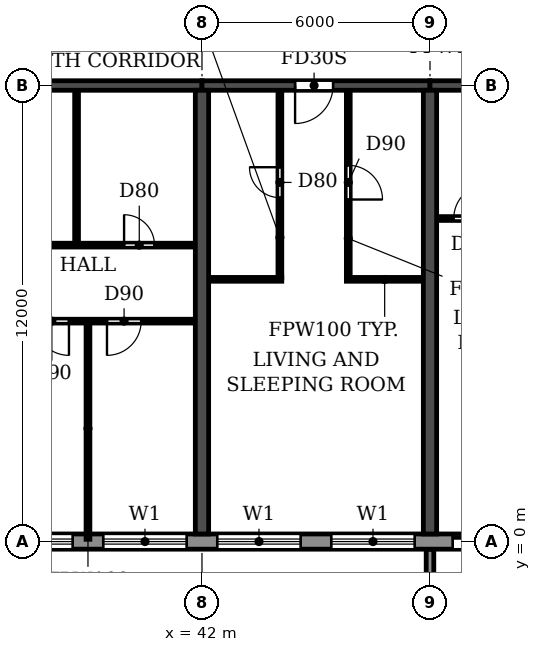
"""IFC4 building model, lengths in metres.
Left out: names, types, materials, properties, quantities, classifications, styles, units other than length and angle.
Written with IfcOpenShell. Run it as: python <this file> out.ifc"""

import sys

from ifc_helpers import new_model, si_unit, direction, frame, frame_2d, origin, place, context, subcontext, project, spatial, polyline, rectangle, outline, extrude, source, transform, mapped, element, fill, save


model = new_model("IFC4")
c1 = context("Model", 3, precision=1e-05, world=origin(), true_north=direction((0.0, 1.0)))
c2 = subcontext(c1, "Body", "Model", "MODEL_VIEW")
j1 = project(units=[si_unit("LENGTHUNIT", "METRE"), si_unit("PLANEANGLEUNIT", "RADIAN")], contexts=[c1])
p1 = place(None, origin())
s1 = spatial("IfcSite", under=j1, at=p1, CompositionType="ELEMENT")
p2 = place(p1, origin())
s2 = spatial("IfcBuilding", under=s1, at=p2, CompositionType="ELEMENT")
p3 = place(p2, frame((0.0, 0.0, 112.5)))
s3 = spatial("IfcBuildingStorey", under=s2, at=p3, CompositionType="ELEMENT", Elevation=112.5)
for number, where, z_axis, x_axis in (
    (1, (42.0, 0.2, 0.0), (0.0, 0.0, 1.0), (0.0, 1.0, 0.0)),
    (2, (48.0, 0.2, 0.0), (0.0, 0.0, 1.0), (0.0, 1.0, 0.0)),
):
    element("IfcWall", number, at=place(p3, frame(where, z_axis=z_axis, x_axis=x_axis)), inside=s3, PredefinedType="SHEAR", context=c2, shape_type="SweptSolid", body=[
        extrude(rectangle(XDim=11.675, YDim=0.35, at=frame_2d((5.837, 0.0))), origin(), (0.0, 0.0, 1.0), 2.95),
    ])
p4 = place(p3, frame((36.0, 12.0, 0.0), z_axis=(0.0, 0.0, 1.0), x_axis=(1.0, 0.0, 0.0)))
e3 = element("IfcWall", 3, at=p4, inside=s3, PredefinedType="SHEAR", context=c2, shape_type="SweptSolid", body=[
    extrude(rectangle(XDim=6.0, YDim=0.25, at=frame_2d((3.0, 0.0))), origin(), (0.0, 0.0, 1.0), 2.35),
])
p5 = place(p3, frame((42.0, 12.0, 0.0), z_axis=(0.0, 0.0, 1.0), x_axis=(1.0, 0.0, 0.0)))
e4 = element("IfcWall", 4, at=p5, inside=s3, PredefinedType="SHEAR", context=c2, shape_type="SweptSolid", body=[
    extrude(rectangle(XDim=6.0, YDim=0.25, at=frame_2d((3.0, 0.0))), origin(), (0.0, 0.0, 1.0), 2.35),
])
p6 = place(p5, frame((2.45, 0.0, 0.0)))
e5 = element("IfcOpeningElement", 5, at=p6, cuts=e4, PredefinedType="OPENING", context=c2, shape_type="SweptSolid", body=[
    extrude(rectangle(XDim=1.0, YDim=2.1, at=frame_2d((0.5, 1.05))), frame((0.0, 0.135, 0.0), z_axis=(0.0, -1.0, 0.0), x_axis=(1.0, 0.0, 0.0)), (0.0, 0.0, 1.0), 0.27),
])
p7 = place(p3, frame((48.0, 12.0, 0.0), z_axis=(0.0, 0.0, 1.0), x_axis=(1.0, 0.0, 0.0)))
e6 = element("IfcWall", 6, at=p7, inside=s3, PredefinedType="SHEAR", context=c2, shape_type="SweptSolid", body=[
    extrude(rectangle(XDim=6.0, YDim=0.25, at=frame_2d((3.0, 0.0))), origin(), (0.0, 0.0, 1.0), 2.35),
])
p8 = place(p7, frame((2.55, 0.0, 0.0)))
e7 = element("IfcOpeningElement", 7, at=p8, cuts=e6, PredefinedType="OPENING", context=c2, shape_type="SweptSolid", body=[
    extrude(rectangle(XDim=1.0, YDim=2.1, at=frame_2d((0.5, 1.05))), frame((0.0, 0.135, 0.0), z_axis=(0.0, -1.0, 0.0), x_axis=(1.0, 0.0, 0.0)), (0.0, 0.0, 1.0), 0.27),
])
p9 = place(p3, frame((16.683, 0.0, 0.0), z_axis=(0.0, 0.0, 1.0), x_axis=(1.0, 0.0, 0.0)))
e8 = element("IfcWall", 8, at=p9, inside=s3, PredefinedType="STANDARD", context=c2, shape_type="SweptSolid", body=[
    extrude(rectangle(XDim=68.634, YDim=0.4, at=frame_2d((34.317, 0.0))), origin(), (0.0, 0.0, 1.0), 2.95),
])
p10 = place(p9, frame((1.717, 0.0, 0.9)))
e9 = element("IfcOpeningElement", 9, at=p10, cuts=e8, PredefinedType="OPENING", context=c2, shape_type="SweptSolid", body=[
    extrude(rectangle(XDim=2.2, YDim=1.5, at=frame_2d((1.1, 0.75))), frame((0.0, 0.21, 0.0), z_axis=(0.0, -1.0, 0.0), x_axis=(1.0, 0.0, 0.0)), (0.0, 0.0, 1.0), 0.42),
])
p11 = place(p9, frame((4.717, 0.0, 0.9)))
e10 = element("IfcOpeningElement", 10, at=p11, cuts=e8, PredefinedType="OPENING", context=c2, shape_type="SweptSolid", body=[
    extrude(rectangle(XDim=2.2, YDim=1.5, at=frame_2d((1.1, 0.75))), frame((0.0, 0.21, 0.0), z_axis=(0.0, -1.0, 0.0), x_axis=(1.0, 0.0, 0.0)), (0.0, 0.0, 1.0), 0.42),
])
p12 = place(p9, frame((7.717, 0.0, 0.9)))
e11 = element("IfcOpeningElement", 11, at=p12, cuts=e8, PredefinedType="OPENING", context=c2, shape_type="SweptSolid", body=[
    extrude(rectangle(XDim=2.2, YDim=1.5, at=frame_2d((1.1, 0.75))), frame((0.0, 0.21, 0.0), z_axis=(0.0, -1.0, 0.0), x_axis=(1.0, 0.0, 0.0)), (0.0, 0.0, 1.0), 0.42),
])
p13 = place(p9, frame((10.917, 0.0, 0.0)))
e12 = element("IfcOpeningElement", 12, at=p13, cuts=e8, PredefinedType="OPENING", context=c2, shape_type="SweptSolid", body=[
    extrude(rectangle(XDim=1.8, YDim=2.4, at=frame_2d((0.9, 1.2))), frame((0.0, 0.21, 0.0), z_axis=(0.0, -1.0, 0.0), x_axis=(1.0, 0.0, 0.0)), (0.0, 0.0, 1.0), 0.42),
])
p14 = place(p9, frame((13.717, 0.0, 0.9)))
e13 = element("IfcOpeningElement", 13, at=p14, cuts=e8, PredefinedType="OPENING", context=c2, shape_type="SweptSolid", body=[
    extrude(rectangle(XDim=2.2, YDim=1.5, at=frame_2d((1.1, 0.75))), frame((0.0, 0.21, 0.0), z_axis=(0.0, -1.0, 0.0), x_axis=(1.0, 0.0, 0.0)), (0.0, 0.0, 1.0), 0.42),
])
p15 = place(p9, frame((16.717, 0.0, 0.9)))
e14 = element("IfcOpeningElement", 14, at=p15, cuts=e8, PredefinedType="OPENING", context=c2, shape_type="SweptSolid", body=[
    extrude(rectangle(XDim=2.2, YDim=1.5, at=frame_2d((1.1, 0.75))), frame((0.0, 0.21, 0.0), z_axis=(0.0, -1.0, 0.0), x_axis=(1.0, 0.0, 0.0)), (0.0, 0.0, 1.0), 0.42),
])
p16 = place(p9, frame((19.717, 0.0, 0.9)))
e15 = element("IfcOpeningElement", 15, at=p16, cuts=e8, PredefinedType="OPENING", context=c2, shape_type="SweptSolid", body=[
    extrude(rectangle(XDim=2.2, YDim=1.5, at=frame_2d((1.1, 0.75))), frame((0.0, 0.21, 0.0), z_axis=(0.0, -1.0, 0.0), x_axis=(1.0, 0.0, 0.0)), (0.0, 0.0, 1.0), 0.42),
])
p17 = place(p9, frame((22.717, 0.0, 0.9)))
e16 = element("IfcOpeningElement", 16, at=p17, cuts=e8, PredefinedType="OPENING", context=c2, shape_type="SweptSolid", body=[
    extrude(rectangle(XDim=2.2, YDim=1.5, at=frame_2d((1.1, 0.75))), frame((0.0, 0.21, 0.0), z_axis=(0.0, -1.0, 0.0), x_axis=(1.0, 0.0, 0.0)), (0.0, 0.0, 1.0), 0.42),
])
p18 = place(p9, frame((25.717, 0.0, 0.9)))
e17 = element("IfcOpeningElement", 17, at=p18, cuts=e8, PredefinedType="OPENING", context=c2, shape_type="SweptSolid", body=[
    extrude(rectangle(XDim=2.2, YDim=1.5, at=frame_2d((1.1, 0.75))), frame((0.0, 0.21, 0.0), z_axis=(0.0, -1.0, 0.0), x_axis=(1.0, 0.0, 0.0)), (0.0, 0.0, 1.0), 0.42),
])
p19 = place(p9, frame((28.717, 0.0, 0.9)))
e18 = element("IfcOpeningElement", 18, at=p19, cuts=e8, PredefinedType="OPENING", context=c2, shape_type="SweptSolid", body=[
    extrude(rectangle(XDim=2.2, YDim=1.5, at=frame_2d((1.1, 0.75))), frame((0.0, 0.21, 0.0), z_axis=(0.0, -1.0, 0.0), x_axis=(1.0, 0.0, 0.0)), (0.0, 0.0, 1.0), 0.42),
])
p20 = place(p9, frame((31.917, 0.0, 0.0)))
e19 = element("IfcOpeningElement", 19, at=p20, cuts=e8, PredefinedType="OPENING", context=c2, shape_type="SweptSolid", body=[
    extrude(rectangle(XDim=1.8, YDim=2.4, at=frame_2d((0.9, 1.2))), frame((0.0, 0.21, 0.0), z_axis=(0.0, -1.0, 0.0), x_axis=(1.0, 0.0, 0.0)), (0.0, 0.0, 1.0), 0.42),
])
p21 = place(p9, frame((34.717, 0.0, 0.9)))
e20 = element("IfcOpeningElement", 20, at=p21, cuts=e8, PredefinedType="OPENING", context=c2, shape_type="SweptSolid", body=[
    extrude(rectangle(XDim=2.2, YDim=1.5, at=frame_2d((1.1, 0.75))), frame((0.0, 0.21, 0.0), z_axis=(0.0, -1.0, 0.0), x_axis=(1.0, 0.0, 0.0)), (0.0, 0.0, 1.0), 0.42),
])
p22 = place(p9, frame((37.717, 0.0, 0.9)))
e21 = element("IfcOpeningElement", 21, at=p22, cuts=e8, PredefinedType="OPENING", context=c2, shape_type="SweptSolid", body=[
    extrude(rectangle(XDim=2.2, YDim=1.5, at=frame_2d((1.1, 0.75))), frame((0.0, 0.21, 0.0), z_axis=(0.0, -1.0, 0.0), x_axis=(1.0, 0.0, 0.0)), (0.0, 0.0, 1.0), 0.42),
])
p23 = place(p9, frame((40.717, 0.0, 0.9)))
e22 = element("IfcOpeningElement", 22, at=p23, cuts=e8, PredefinedType="OPENING", context=c2, shape_type="SweptSolid", body=[
    extrude(rectangle(XDim=2.2, YDim=1.5, at=frame_2d((1.1, 0.75))), frame((0.0, 0.21, 0.0), z_axis=(0.0, -1.0, 0.0), x_axis=(1.0, 0.0, 0.0)), (0.0, 0.0, 1.0), 0.42),
])
p24 = place(p9, frame((43.717, 0.0, 0.9)))
e23 = element("IfcOpeningElement", 23, at=p24, cuts=e8, PredefinedType="OPENING", context=c2, shape_type="SweptSolid", body=[
    extrude(rectangle(XDim=2.2, YDim=1.5, at=frame_2d((1.1, 0.75))), frame((0.0, 0.21, 0.0), z_axis=(0.0, -1.0, 0.0), x_axis=(1.0, 0.0, 0.0)), (0.0, 0.0, 1.0), 0.42),
])
p25 = place(p9, frame((46.917, 0.0, 0.0)))
e24 = element("IfcOpeningElement", 24, at=p25, cuts=e8, PredefinedType="OPENING", context=c2, shape_type="SweptSolid", body=[
    extrude(rectangle(XDim=1.8, YDim=2.4, at=frame_2d((0.9, 1.2))), frame((0.0, 0.21, 0.0), z_axis=(0.0, -1.0, 0.0), x_axis=(1.0, 0.0, 0.0)), (0.0, 0.0, 1.0), 0.42),
])
p26 = place(p9, frame((49.717, 0.0, 0.9)))
e25 = element("IfcOpeningElement", 25, at=p26, cuts=e8, PredefinedType="OPENING", context=c2, shape_type="SweptSolid", body=[
    extrude(rectangle(XDim=2.2, YDim=1.5, at=frame_2d((1.1, 0.75))), frame((0.0, 0.21, 0.0), z_axis=(0.0, -1.0, 0.0), x_axis=(1.0, 0.0, 0.0)), (0.0, 0.0, 1.0), 0.42),
])
p27 = place(p9, frame((52.717, 0.0, 0.9)))
e26 = element("IfcOpeningElement", 26, at=p27, cuts=e8, PredefinedType="OPENING", context=c2, shape_type="SweptSolid", body=[
    extrude(rectangle(XDim=2.2, YDim=1.5, at=frame_2d((1.1, 0.75))), frame((0.0, 0.21, 0.0), z_axis=(0.0, -1.0, 0.0), x_axis=(1.0, 0.0, 0.0)), (0.0, 0.0, 1.0), 0.42),
])
p28 = place(p9, frame((55.717, 0.0, 0.9)))
e27 = element("IfcOpeningElement", 27, at=p28, cuts=e8, PredefinedType="OPENING", context=c2, shape_type="SweptSolid", body=[
    extrude(rectangle(XDim=2.2, YDim=1.5, at=frame_2d((1.1, 0.75))), frame((0.0, 0.21, 0.0), z_axis=(0.0, -1.0, 0.0), x_axis=(1.0, 0.0, 0.0)), (0.0, 0.0, 1.0), 0.42),
])
p29 = place(p9, frame((58.717, 0.0, 0.9)))
e28 = element("IfcOpeningElement", 28, at=p29, cuts=e8, PredefinedType="OPENING", context=c2, shape_type="SweptSolid", body=[
    extrude(rectangle(XDim=2.2, YDim=1.5, at=frame_2d((1.1, 0.75))), frame((0.0, 0.21, 0.0), z_axis=(0.0, -1.0, 0.0), x_axis=(1.0, 0.0, 0.0)), (0.0, 0.0, 1.0), 0.42),
])
p30 = place(p9, frame((61.717, 0.0, 0.9)))
e29 = element("IfcOpeningElement", 29, at=p30, cuts=e8, PredefinedType="OPENING", context=c2, shape_type="SweptSolid", body=[
    extrude(rectangle(XDim=2.2, YDim=1.5, at=frame_2d((1.1, 0.75))), frame((0.0, 0.21, 0.0), z_axis=(0.0, -1.0, 0.0), x_axis=(1.0, 0.0, 0.0)), (0.0, 0.0, 1.0), 0.42),
])
p31 = place(p9, frame((64.717, 0.0, 0.9)))
e30 = element("IfcOpeningElement", 30, at=p31, cuts=e8, PredefinedType="OPENING", context=c2, shape_type="SweptSolid", body=[
    extrude(rectangle(XDim=2.2, YDim=1.5, at=frame_2d((1.1, 0.75))), frame((0.0, 0.21, 0.0), z_axis=(0.0, -1.0, 0.0), x_axis=(1.0, 0.0, 0.0)), (0.0, 0.0, 1.0), 0.42),
])
m1 = source(origin(), c2, "Body", "SweptSolid", [
    extrude(outline(polyline([(0.0, 0.0), (0.2, 0.0), (0.2, 1.65), (0.0, 1.65), (0.0, 0.0)])), origin(), (0.0, 0.0, 1.0), 3.1),
])
p32 = place(p3, frame((47.9, -1.85, 0.0)))
e31 = element("IfcWall", 31, at=p32, inside=s3, PredefinedType="STANDARD", context=c2, shape_type="MappedRepresentation", body=[
    mapped(m1, transform((0.0, 0.0, 0.0))),
])
p33 = place(p3, frame((36.185, 5.8, 0.0), z_axis=(0.0, 0.0, 1.0), x_axis=(1.0, 0.0, 0.0)))
e32 = element("IfcWall", 32, at=p33, inside=s3, PredefinedType="PARTITIONING", context=c2, shape_type="SweptSolid", body=[
    extrude(rectangle(XDim=5.63, YDim=0.1, at=frame_2d((2.815, 0.0))), origin(), (0.0, 0.0, 1.0), 2.95),
])
p34 = place(p33, frame((1.415, 0.0, 0.0)))
e33 = element("IfcOpeningElement", 33, at=p34, cuts=e32, PredefinedType="OPENING", context=c2, shape_type="SweptSolid", body=[
    extrude(rectangle(XDim=0.9, YDim=2.1, at=frame_2d((0.45, 1.05))), frame((0.0, 0.06, 0.0), z_axis=(0.0, -1.0, 0.0), x_axis=(1.0, 0.0, 0.0)), (0.0, 0.0, 1.0), 0.12),
])
p35 = place(p33, frame((3.315, 0.0, 0.0)))
e34 = element("IfcOpeningElement", 34, at=p35, cuts=e32, PredefinedType="OPENING", context=c2, shape_type="SweptSolid", body=[
    extrude(rectangle(XDim=0.9, YDim=2.1, at=frame_2d((0.45, 1.05))), frame((0.0, 0.06, 0.0), z_axis=(0.0, -1.0, 0.0), x_axis=(1.0, 0.0, 0.0)), (0.0, 0.0, 1.0), 0.12),
])
p36 = place(p3, frame((42.185, 6.9, 0.0), z_axis=(0.0, 0.0, 1.0), x_axis=(1.0, 0.0, 0.0)))
e35 = element("IfcWall", 35, at=p36, inside=s3, PredefinedType="PARTITIONING", context=c2, shape_type="SweptSolid", body=[
    extrude(rectangle(XDim=1.915, YDim=0.1, at=frame_2d((0.958, 0.0))), origin(), (0.0, 0.0, 1.0), 2.95),
])
p37 = place(p3, frame((45.8, 6.9, 0.0), z_axis=(0.0, 0.0, 1.0), x_axis=(1.0, 0.0, 0.0)))
e36 = element("IfcWall", 36, at=p37, inside=s3, PredefinedType="PARTITIONING", context=c2, shape_type="SweptSolid", body=[
    extrude(rectangle(XDim=2.015, YDim=0.1, at=frame_2d((1.007, 0.0))), origin(), (0.0, 0.0, 1.0), 2.95),
])
p38 = place(p3, frame((36.185, 7.8, 0.0), z_axis=(0.0, 0.0, 1.0), x_axis=(1.0, 0.0, 0.0)))
e37 = element("IfcWall", 37, at=p38, inside=s3, PredefinedType="PARTITIONING", context=c2, shape_type="SweptSolid", body=[
    extrude(rectangle(XDim=5.63, YDim=0.1, at=frame_2d((2.815, 0.0))), origin(), (0.0, 0.0, 1.0), 2.95),
])
p39 = place(p38, frame((0.765, 0.0, 0.0)))
e38 = element("IfcOpeningElement", 38, at=p39, cuts=e37, PredefinedType="OPENING", context=c2, shape_type="SweptSolid", body=[
    extrude(rectangle(XDim=0.8, YDim=2.1, at=frame_2d((0.4, 1.05))), frame((0.0, 0.06, 0.0), z_axis=(0.0, -1.0, 0.0), x_axis=(1.0, 0.0, 0.0)), (0.0, 0.0, 1.0), 0.12),
])
p40 = place(p38, frame((3.765, 0.0, 0.0)))
e39 = element("IfcOpeningElement", 39, at=p40, cuts=e37, PredefinedType="OPENING", context=c2, shape_type="SweptSolid", body=[
    extrude(rectangle(XDim=0.8, YDim=2.1, at=frame_2d((0.4, 1.05))), frame((0.0, 0.06, 0.0), z_axis=(0.0, -1.0, 0.0), x_axis=(1.0, 0.0, 0.0)), (0.0, 0.0, 1.0), 0.12),
])
p41 = place(p3, frame((48.185, 8.5, 0.0), z_axis=(0.0, 0.0, 1.0), x_axis=(1.0, 0.0, 0.0)))
e40 = element("IfcWall", 40, at=p41, inside=s3, PredefinedType="PARTITIONING", context=c2, shape_type="SweptSolid", body=[
    extrude(rectangle(XDim=2.015, YDim=0.1, at=frame_2d((1.007, 0.0))), origin(), (0.0, 0.0, 1.0), 2.95),
])
p42 = place(p41, frame((0.44, 0.0, 0.0)))
e41 = element("IfcOpeningElement", 41, at=p42, cuts=e40, PredefinedType="OPENING", context=c2, shape_type="SweptSolid", body=[
    extrude(rectangle(XDim=0.9, YDim=2.1, at=frame_2d((0.45, 1.05))), frame((0.0, 0.06, 0.0), z_axis=(0.0, -1.0, 0.0), x_axis=(1.0, 0.0, 0.0)), (0.0, 0.0, 1.0), 0.12),
])
p43 = place(p3, frame((38.7, 7.85, 0.0), z_axis=(0.0, 0.0, 1.0), x_axis=(0.0, 1.0, 0.0)))
e42 = element("IfcWall", 42, at=p43, inside=s3, PredefinedType="PARTITIONING", context=c2, shape_type="SweptSolid", body=[
    extrude(rectangle(XDim=4.015, YDim=0.1, at=frame_2d((2.007, 0.0))), origin(), (0.0, 0.0, 1.0), 2.95),
])
p44 = place(p3, frame((39.0, 0.06, 0.0), z_axis=(0.0, 0.0, 1.0), x_axis=(0.0, 1.0, 0.0)))
e43 = element("IfcWall", 43, at=p44, inside=s3, PredefinedType="PARTITIONING", context=c2, shape_type="SweptSolid", body=[
    extrude(rectangle(XDim=5.69, YDim=0.1, at=frame_2d((2.845, 0.0))), origin(), (0.0, 0.0, 1.0), 2.95),
])
p45 = place(p3, frame((44.05, 6.95, 0.0), z_axis=(0.0, 0.0, 1.0), x_axis=(0.0, 1.0, 0.0)))
e44 = element("IfcWall", 44, at=p45, inside=s3, PredefinedType="PARTITIONING", context=c2, shape_type="SweptSolid", body=[
    extrude(rectangle(XDim=4.915, YDim=0.1, at=frame_2d((2.458, 0.0))), origin(), (0.0, 0.0, 1.0), 2.95),
])
p46 = place(p45, frame((2.1, 0.0, 0.0)))
e45 = element("IfcOpeningElement", 45, at=p46, cuts=e44, PredefinedType="OPENING", context=c2, shape_type="SweptSolid", body=[
    extrude(rectangle(XDim=0.8, YDim=2.1, at=frame_2d((0.4, 1.05))), frame((0.0, 0.06, 0.0), z_axis=(0.0, -1.0, 0.0), x_axis=(1.0, 0.0, 0.0)), (0.0, 0.0, 1.0), 0.12),
])
p47 = place(p3, frame((45.85, 6.95, 0.0), z_axis=(0.0, 0.0, 1.0), x_axis=(0.0, 1.0, 0.0)))
e46 = element("IfcWall", 46, at=p47, inside=s3, PredefinedType="PARTITIONING", context=c2, shape_type="SweptSolid", body=[
    extrude(rectangle(XDim=4.915, YDim=0.1, at=frame_2d((2.458, 0.0))), origin(), (0.0, 0.0, 1.0), 2.95),
])
p48 = place(p47, frame((2.05, 0.0, 0.0)))
e47 = element("IfcOpeningElement", 47, at=p48, cuts=e46, PredefinedType="OPENING", context=c2, shape_type="SweptSolid", body=[
    extrude(rectangle(XDim=0.9, YDim=2.1, at=frame_2d((0.45, 1.05))), frame((0.0, 0.06, 0.0), z_axis=(0.0, -1.0, 0.0), x_axis=(1.0, 0.0, 0.0)), (0.0, 0.0, 1.0), 0.12),
])
p49 = place(p16, origin())
e48 = element("IfcWindow", 48, at=p49, inside=s3, PartitioningType="DOUBLE_PANEL_HORIZONTAL", PredefinedType="WINDOW", context=c2, shape_type="SweptSolid", body=[
    extrude(rectangle(XDim=2.2, YDim=1.5, at=frame_2d((1.1, 0.75))), frame((0.0, 0.03, 0.0), z_axis=(0.0, -1.0, 0.0), x_axis=(1.0, 0.0, 0.0)), (0.0, 0.0, 1.0), 0.06),
])
fill(e15, e48)
p50 = place(p17, origin())
e49 = element("IfcWindow", 49, at=p50, inside=s3, PartitioningType="DOUBLE_PANEL_HORIZONTAL", PredefinedType="WINDOW", context=c2, shape_type="SweptSolid", body=[
    extrude(rectangle(XDim=2.2, YDim=1.5, at=frame_2d((1.1, 0.75))), frame((0.0, 0.03, 0.0), z_axis=(0.0, -1.0, 0.0), x_axis=(1.0, 0.0, 0.0)), (0.0, 0.0, 1.0), 0.06),
])
fill(e16, e49)
p51 = place(p18, origin())
e50 = element("IfcWindow", 50, at=p51, inside=s3, PartitioningType="DOUBLE_PANEL_HORIZONTAL", PredefinedType="WINDOW", context=c2, shape_type="SweptSolid", body=[
    extrude(rectangle(XDim=2.2, YDim=1.5, at=frame_2d((1.1, 0.75))), frame((0.0, 0.03, 0.0), z_axis=(0.0, -1.0, 0.0), x_axis=(1.0, 0.0, 0.0)), (0.0, 0.0, 1.0), 0.06),
])
fill(e17, e50)
p52 = place(p19, origin())
e51 = element("IfcWindow", 51, at=p52, inside=s3, PartitioningType="DOUBLE_PANEL_HORIZONTAL", PredefinedType="WINDOW", context=c2, shape_type="SweptSolid", body=[
    extrude(rectangle(XDim=2.2, YDim=1.5, at=frame_2d((1.1, 0.75))), frame((0.0, 0.03, 0.0), z_axis=(0.0, -1.0, 0.0), x_axis=(1.0, 0.0, 0.0)), (0.0, 0.0, 1.0), 0.06),
])
fill(e18, e51)
p53 = place(p20, origin())
e52 = element("IfcDoor", 52, at=p53, inside=s3, OperationType="DOUBLE_DOOR_SLIDING", PredefinedType="DOOR", context=c2, shape_type="SweptSolid", body=[
    extrude(rectangle(XDim=1.8, YDim=2.4, at=frame_2d((0.9, 1.2))), frame((0.0, 0.025, 0.0), z_axis=(0.0, -1.0, 0.0), x_axis=(1.0, 0.0, 0.0)), (0.0, 0.0, 1.0), 0.05),
])
fill(e19, e52)
p54 = place(p34, frame((0.9, 0.0, 0.0), z_axis=(0.0, 0.0, 1.0), x_axis=(-1.0, 0.0, 0.0)))
e53 = element("IfcDoor", 53, at=p54, inside=s3, OperationType="SINGLE_SWING_LEFT", PredefinedType="DOOR", context=c2, shape_type="SweptSolid", body=[
    extrude(rectangle(XDim=0.9, YDim=2.1, at=frame_2d((0.45, 1.05))), frame((0.0, 0.025, 0.0), z_axis=(0.0, -1.0, 0.0), x_axis=(1.0, 0.0, 0.0)), (0.0, 0.0, 1.0), 0.05),
])
fill(e33, e53)
p55 = place(p35, frame((0.9, 0.0, 0.0), z_axis=(0.0, 0.0, 1.0), x_axis=(-1.0, 0.0, 0.0)))
e54 = element("IfcDoor", 54, at=p55, inside=s3, OperationType="SINGLE_SWING_RIGHT", PredefinedType="DOOR", context=c2, shape_type="SweptSolid", body=[
    extrude(rectangle(XDim=0.9, YDim=2.1, at=frame_2d((0.45, 1.05))), frame((0.0, 0.025, 0.0), z_axis=(0.0, -1.0, 0.0), x_axis=(1.0, 0.0, 0.0)), (0.0, 0.0, 1.0), 0.05),
])
fill(e34, e54)
p56 = place(p40, origin())
e55 = element("IfcDoor", 55, at=p56, inside=s3, OperationType="SINGLE_SWING_LEFT", PredefinedType="DOOR", context=c2, shape_type="SweptSolid", body=[
    extrude(rectangle(XDim=0.8, YDim=2.1, at=frame_2d((0.4, 1.05))), frame((0.0, 0.025, 0.0), z_axis=(0.0, -1.0, 0.0), x_axis=(1.0, 0.0, 0.0)), (0.0, 0.0, 1.0), 0.05),
])
fill(e39, e55)
p57 = place(p46, origin())
e56 = element("IfcDoor", 56, at=p57, inside=s3, OperationType="SINGLE_SWING_RIGHT", PredefinedType="DOOR", context=c2, shape_type="SweptSolid", body=[
    extrude(rectangle(XDim=0.8, YDim=2.1, at=frame_2d((0.4, 1.05))), frame((0.0, 0.025, 0.0), z_axis=(0.0, -1.0, 0.0), x_axis=(1.0, 0.0, 0.0)), (0.0, 0.0, 1.0), 0.05),
])
fill(e45, e56)
p58 = place(p6, frame((1.0, 0.0, 0.0), z_axis=(0.0, 0.0, 1.0), x_axis=(-1.0, 0.0, 0.0)))
e57 = element("IfcDoor", 57, at=p58, inside=s3, OperationType="SINGLE_SWING_RIGHT", PredefinedType="DOOR", context=c2, shape_type="SweptSolid", body=[
    extrude(rectangle(XDim=1.0, YDim=2.1, at=frame_2d((0.5, 1.05))), frame((0.0, 0.025, 0.0), z_axis=(0.0, -1.0, 0.0), x_axis=(1.0, 0.0, 0.0)), (0.0, 0.0, 1.0), 0.05),
])
fill(e5, e57)
p59 = place(p48, frame((0.9, 0.0, 0.0), z_axis=(0.0, 0.0, 1.0), x_axis=(-1.0, 0.0, 0.0)))
e58 = element("IfcDoor", 58, at=p59, inside=s3, OperationType="SINGLE_SWING_RIGHT", PredefinedType="DOOR", context=c2, shape_type="SweptSolid", body=[
    extrude(rectangle(XDim=0.9, YDim=2.1, at=frame_2d((0.45, 1.05))), frame((0.0, 0.025, 0.0), z_axis=(0.0, -1.0, 0.0), x_axis=(1.0, 0.0, 0.0)), (0.0, 0.0, 1.0), 0.05),
])
fill(e47, e58)
p60 = place(p42, origin())
e59 = element("IfcDoor", 59, at=p60, inside=s3, OperationType="SINGLE_SWING_RIGHT", PredefinedType="DOOR", context=c2, shape_type="SweptSolid", body=[
    extrude(rectangle(XDim=0.9, YDim=2.1, at=frame_2d((0.45, 1.05))), frame((0.0, 0.025, 0.0), z_axis=(0.0, -1.0, 0.0), x_axis=(1.0, 0.0, 0.0)), (0.0, 0.0, 1.0), 0.05),
])
fill(e41, e59)
save(model, sys.argv[1])
